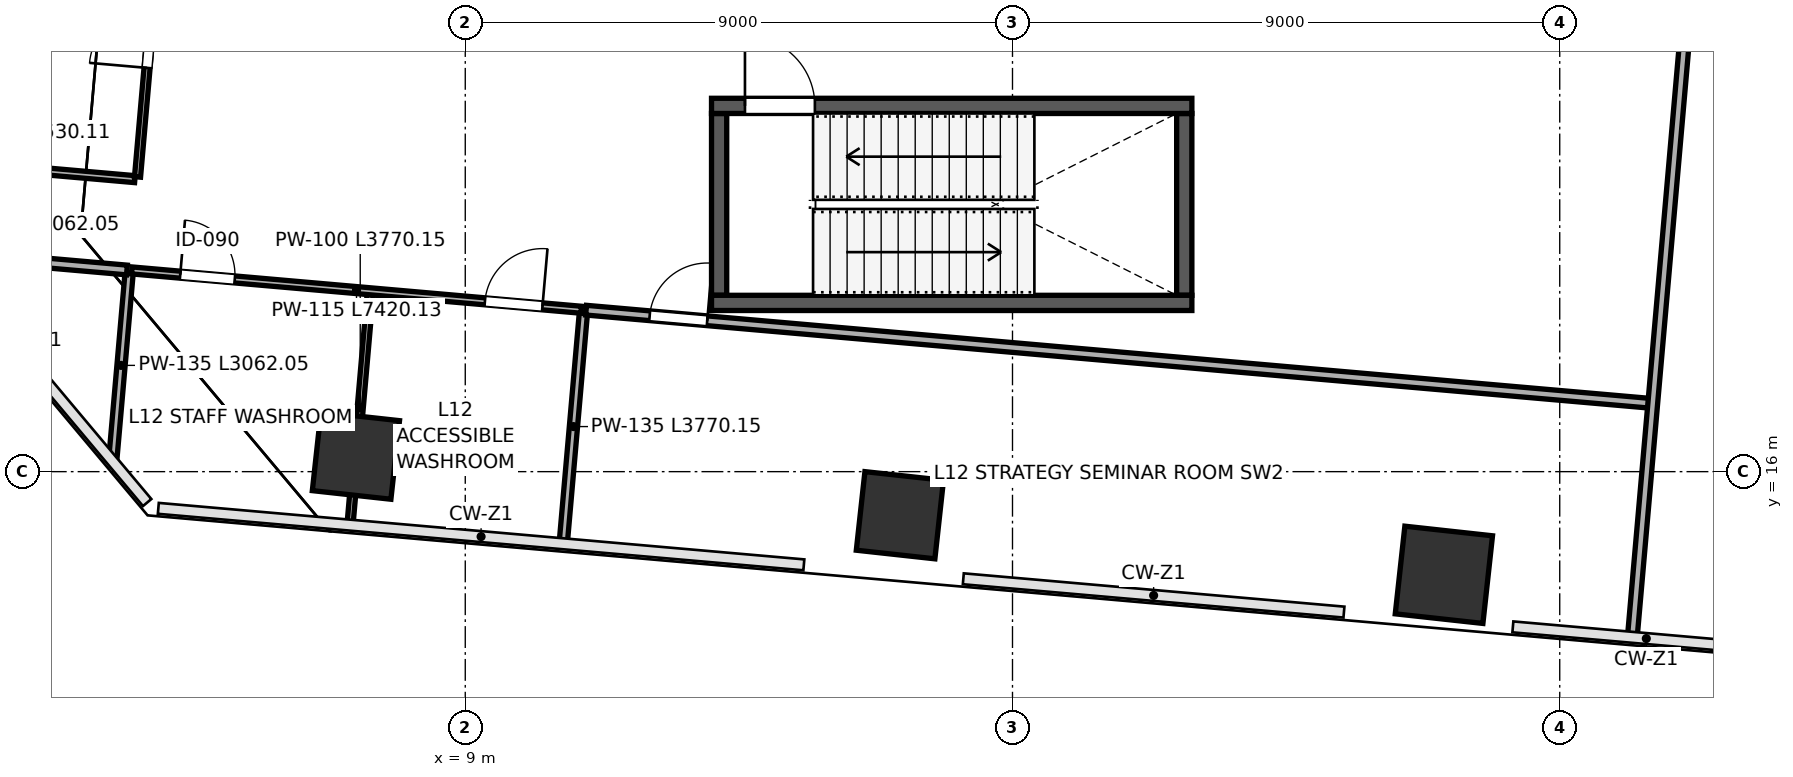
"""IFC4 building model, lengths in metres.
Left out: names, types, materials, properties, quantities, classifications, styles, units other than length and angle.
Written with IfcOpenShell. Run it as: python <this file> out.ifc"""

import sys

from ifc_helpers import new_model, si_unit, direction, frame, frame_2d, origin, origin_2d, place, context, subcontext, project, spatial, rectangle, extrude, clip, halfspace, source, transform, mapped, element, fill, save


model = new_model("IFC4")
c1 = context("Model", 3, precision=1e-05, world=origin(), true_north=direction((0.0, 1.0)))
c2 = subcontext(c1, "Body", "Model", "MODEL_VIEW")
j1 = project(units=[si_unit("LENGTHUNIT", "METRE"), si_unit("PLANEANGLEUNIT", "RADIAN")], contexts=[c1])
p1 = place(None, origin())
s1 = spatial("IfcSite", under=j1, at=p1, CompositionType="ELEMENT")
p2 = place(p1, origin())
s2 = spatial("IfcBuilding", under=s1, at=p2, CompositionType="ELEMENT")
p3 = place(p2, frame((0.0, 0.0, 56.8)))
s3 = spatial("IfcBuildingStorey", under=s2, at=p3, CompositionType="ELEMENT", Elevation=56.8)
p4 = place(p3, frame((7.202, 16.263, 0.0), z_axis=(-0.070522413376, 0.065409158709, 0.995363366399), x_axis=(0.75543486805, 0.655140067621, 0.010471481808)))
e1 = element("IfcColumn", 1, at=p4, inside=s3, PredefinedType="COLUMN", context=c2, shape_type="Clipping", body=[
    clip(clip(extrude(rectangle(XDim=1.3, YDim=1.3, at=origin_2d()), origin(), (0.0, 0.0, 1.0), 4.823), halfspace(frame((0.0, 0.0, 0.07), z_axis=(0.0, 0.0, -1.0), x_axis=(1.0, 0.0, 0.0)), False)), halfspace(frame((0.0, 0.0, 4.752), z_axis=(0.0, 0.0, 1.0), x_axis=(1.0, 0.0, 0.0)), False)),
])
p5 = place(p3, frame((16.148, 15.283, 0.0), z_axis=(-0.075443228527, 0.025097041748, 0.996834217794), x_axis=(0.416751618135, 0.908979188918, 0.008655801295)))
e2 = element("IfcColumn", 2, at=p5, inside=s3, PredefinedType="COLUMN", context=c2, shape_type="Clipping", body=[
    clip(clip(extrude(rectangle(XDim=1.3, YDim=1.3, at=origin_2d()), origin(), (0.0, 0.0, 1.0), 4.815), halfspace(frame((0.0, 0.0, 0.058), z_axis=(0.0, 0.0, -1.0), x_axis=(1.0, 0.0, 0.0)), False)), halfspace(frame((0.0, 0.0, 4.757), z_axis=(0.0, 0.0, 1.0), x_axis=(1.0, 0.0, 0.0)), False)),
])
p6 = place(p3, frame((25.095, 14.303, 0.0), z_axis=(-0.080295848656, -0.015410314389, 0.996651944712), x_axis=(-0.080801482977, 0.996690468965, 0.008901091172)))
e3 = element("IfcColumn", 3, at=p6, inside=s3, PredefinedType="COLUMN", context=c2, shape_type="Clipping", body=[
    clip(clip(extrude(rectangle(XDim=1.45, YDim=1.45, at=origin_2d()), origin(), (0.0, 0.0, 1.0), 4.816), halfspace(frame((0.0, 0.0, 0.066), z_axis=(0.0, 0.0, -1.0), x_axis=(1.0, 0.0, 0.0)), False)), halfspace(frame((0.0, 0.0, 4.75), z_axis=(0.0, 0.0, 1.0), x_axis=(1.0, 0.0, 0.0)), False)),
])
for number, where, z_axis, x_axis in (
    (4, (13.175, 18.9, 0.0), (0.0, 0.0, 1.0), (0.0, 1.0, 0.0)),
    (5, (20.825, 18.9, 0.0), (0.0, 0.0, 1.0), (0.0, 1.0, 0.0)),
):
    element("IfcWall", number, at=place(p3, frame(where, z_axis=z_axis, x_axis=x_axis)), inside=s3, PredefinedType="SHEAR", context=c2, shape_type="SweptSolid", body=[
        extrude(rectangle(XDim=2.99, YDim=0.25, at=frame_2d((1.495, 0.0))), origin(), (0.0, 0.0, 1.0), 4.56),
    ])
p7 = place(p3, frame((13.05, 18.775, 0.0), z_axis=(0.0, 0.0, 1.0), x_axis=(1.0, 0.0, 0.0)))
e6 = element("IfcWall", 6, at=p7, inside=s3, PredefinedType="SHEAR", context=c2, shape_type="SweptSolid", body=[
    extrude(rectangle(XDim=7.9, YDim=0.25, at=frame_2d((3.95, 0.0))), origin(), (0.0, 0.0, 1.0), 4.56),
])
p8 = place(p3, frame((13.05, 22.015, 0.0), z_axis=(0.0, 0.0, 1.0), x_axis=(1.0, 0.0, 0.0)))
e7 = element("IfcWall", 7, at=p8, inside=s3, PredefinedType="SHEAR", context=c2, shape_type="SweptSolid", body=[
    extrude(rectangle(XDim=7.9, YDim=0.25, at=frame_2d((3.95, 0.0))), origin(), (0.0, 0.0, 1.0), 4.56),
])
p9 = place(p8, frame((0.55, 0.0, 0.0)))
e8 = element("IfcOpeningElement", 8, at=p9, cuts=e7, PredefinedType="OPENING", context=c2, shape_type="SweptSolid", body=[
    extrude(rectangle(XDim=1.15, YDim=2.2, at=frame_2d((0.575, 1.1))), frame((0.0, 0.135, 0.0), z_axis=(0.0, -1.0, 0.0), x_axis=(1.0, 0.0, 0.0)), (0.0, 0.0, 1.0), 0.27),
])
p10 = place(p3, frame((3.205, 16.222, 0.0), z_axis=(0.0, 0.0, 1.0), x_axis=(0.087149146451, 0.996195275171, 0.0)))
e9 = element("IfcWall", 9, at=p10, inside=s3, PredefinedType="PARTITIONING", context=c2, shape_type="SweptSolid", body=[
    extrude(rectangle(XDim=3.062, YDim=0.135, at=frame_2d((1.531, 0.0))), origin(), (0.0, 0.0, 1.0), 4.56),
])
p11 = place(p3, frame((0.385, 19.583, 0.0), z_axis=(0.0, 0.0, 1.0), x_axis=(0.996195275171, -0.087149146451, 0.0)))
e10 = element("IfcWall", 10, at=p11, inside=s3, PredefinedType="PARTITIONING", context=c2, shape_type="SweptSolid", body=[
    extrude(rectangle(XDim=3.062, YDim=0.16, at=frame_2d((1.531, 0.0))), origin(), (0.0, 0.0, 1.0), 4.56),
])
p12 = place(p3, frame((7.108, 15.17, 0.0), z_axis=(0.0, 0.0, 1.0), x_axis=(0.087160523959, 0.996194279778, 0.0)))
e11 = element("IfcWall", 11, at=p12, inside=s3, PredefinedType="PARTITIONING", context=c2, shape_type="SweptSolid", body=[
    extrude(rectangle(XDim=3.77, YDim=0.1, at=frame_2d((1.885, 0.0))), origin(), (0.0, 0.0, 1.0), 3.695),
])
p13 = place(p3, frame((10.615, 14.863, 0.0), z_axis=(0.0, 0.0, 1.0), x_axis=(0.087160523959, 0.996194279778, 0.0)))
e12 = element("IfcWall", 12, at=p13, inside=s3, PredefinedType="PARTITIONING", context=c2, shape_type="SweptSolid", body=[
    extrude(rectangle(XDim=3.77, YDim=0.135, at=frame_2d((1.885, 0.0))), origin(), (0.0, 0.0, 1.0), 3.695),
])
p14 = place(p3, frame((3.515, 19.309, 0.0), z_axis=(0.0, 0.0, 1.0), x_axis=(0.99619725236, -0.0871265424, 0.0)))
e13 = element("IfcWall", 13, at=p14, inside=s3, PredefinedType="PARTITIONING", context=c2, shape_type="SweptSolid", body=[
    extrude(rectangle(XDim=7.42, YDim=0.115, at=frame_2d((3.71, 0.0))), origin(), (0.0, 0.0, 1.0), 4.56),
])
p15 = place(p14, frame((0.8, 0.0, 0.0)))
e14 = element("IfcOpeningElement", 14, at=p15, cuts=e13, PredefinedType="OPENING", context=c2, shape_type="SweptSolid", body=[
    extrude(rectangle(XDim=0.9, YDim=2.15, at=frame_2d((0.45, 1.075))), frame((0.0, 0.067, 0.0), z_axis=(0.0, -1.0, 0.0), x_axis=(1.0, 0.0, 0.0)), (0.0, 0.0, 1.0), 0.135),
])
p16 = place(p14, frame((5.83, 0.0, 0.0)))
e15 = element("IfcOpeningElement", 15, at=p16, cuts=e13, PredefinedType="OPENING", context=c2, shape_type="SweptSolid", body=[
    extrude(rectangle(XDim=0.95, YDim=2.15, at=frame_2d((0.475, 1.075))), frame((0.0, 0.067, 0.0), z_axis=(0.0, -1.0, 0.0), x_axis=(1.0, 0.0, 0.0)), (0.0, 0.0, 1.0), 0.135),
])
p17 = place(p3, frame((10.987, 18.656, 0.0), z_axis=(0.0, 0.0, 1.0), x_axis=(0.99619508988, -0.087151264471, 0.0)))
e16 = element("IfcWall", 16, at=p17, inside=s3, PredefinedType="PARTITIONING", context=c2, shape_type="SweptSolid", body=[
    extrude(rectangle(XDim=17.57, YDim=0.16, at=frame_2d((8.785, 0.0))), origin(), (0.0, 0.0, 1.0), 4.56),
])
p18 = place(p17, frame((1.05, 0.0, 0.0)))
e17 = element("IfcOpeningElement", 17, at=p18, cuts=e16, PredefinedType="OPENING", context=c2, shape_type="SweptSolid", body=[
    extrude(rectangle(XDim=0.95, YDim=2.15, at=frame_2d((0.475, 1.075))), frame((0.0, 0.09, 0.0), z_axis=(0.0, -1.0, 0.0), x_axis=(1.0, 0.0, 0.0)), (0.0, 0.0, 1.0), 0.18),
])
p19 = place(p3, frame((-0.05, 21.127, 0.0), z_axis=(0.0, 0.0, 1.0), x_axis=(0.996194520424, -0.087157773474, 0.0)))
e18 = element("IfcWall", 18, at=p19, inside=s3, PredefinedType="PARTITIONING", context=c2, shape_type="SweptSolid", body=[
    extrude(rectangle(XDim=3.63, YDim=0.115, at=frame_2d((1.815, 0.0))), origin(), (0.0, 0.0, 1.0), 4.56),
])
p20 = place(p3, frame((3.61, 20.847, 0.0), z_axis=(0.0, 0.0, 1.0), x_axis=(0.087153664928, 0.996194879875, 0.0)))
e19 = element("IfcWall", 19, at=p20, inside=s3, PredefinedType="PARTITIONING", context=c2, shape_type="SweptSolid", body=[
    extrude(rectangle(XDim=23.48, YDim=0.1, at=frame_2d((11.74, 0.0))), origin(), (0.0, 0.0, 1.0), 3.695),
])
p21 = place(p20, frame((1.8, 0.0, 0.0)))
e20 = element("IfcOpeningElement", 20, at=p21, cuts=e19, PredefinedType="OPENING", context=c2, shape_type="SweptSolid", body=[
    extrude(rectangle(XDim=0.95, YDim=2.15, at=frame_2d((0.475, 1.075))), frame((0.0, 0.06, 0.0), z_axis=(0.0, -1.0, 0.0), x_axis=(1.0, 0.0, 0.0)), (0.0, 0.0, 1.0), 0.12),
])
p22 = place(p3, frame((28.198, 13.325, 0.0), z_axis=(0.0, 0.0, 1.0), x_axis=(0.087154794008, 0.996194781095, 0.0)))
e21 = element("IfcWall", 21, at=p22, inside=s3, PredefinedType="PARTITIONING", context=c2, shape_type="SweptSolid", body=[
    extrude(rectangle(XDim=20.18, YDim=0.16, at=frame_2d((10.09, 0.0))), origin(), (0.0, 0.0, 1.0), 4.56),
])
m1 = source(origin(), c2, "Body", "SweptSolid", [
    extrude(rectangle(XDim=1.15, YDim=2.2, at=frame_2d((0.575, 1.1))), frame((0.0, 0.025, 0.0), z_axis=(0.0, -1.0, 0.0), x_axis=(1.0, 0.0, 0.0)), (0.0, 0.0, 1.0), 0.05),
])
p23 = place(p9, origin())
e22 = element("IfcDoor", 22, at=p23, inside=s3, OperationType="SINGLE_SWING_LEFT", PredefinedType="DOOR", context=c2, shape_type="MappedRepresentation", body=[
    mapped(m1, transform((0.0, 0.0, 0.0), scale=1.0)),
])
fill(e8, e22)
m2 = source(origin(), c2, "Body", "SweptSolid", [
    extrude(rectangle(XDim=0.9, YDim=2.15, at=frame_2d((0.45, 1.075))), frame((0.0, 0.025, 0.0), z_axis=(0.0, -1.0, 0.0), x_axis=(1.0, 0.0, 0.0)), (0.0, 0.0, 1.0), 0.05),
])
p24 = place(p15, origin())
e23 = element("IfcDoor", 23, at=p24, inside=s3, OperationType="SINGLE_SWING_LEFT", PredefinedType="DOOR", context=c2, shape_type="MappedRepresentation", body=[
    mapped(m2, transform((0.0, 0.0, 0.0), scale=1.0)),
])
fill(e14, e23)
m3 = source(origin(), c2, "Body", "SweptSolid", [
    extrude(rectangle(XDim=0.95, YDim=2.15, at=frame_2d((0.475, 1.075))), frame((0.0, 0.025, 0.0), z_axis=(0.0, -1.0, 0.0), x_axis=(1.0, 0.0, 0.0)), (0.0, 0.0, 1.0), 0.05),
])
p25 = place(p16, origin())
e24 = element("IfcDoor", 24, at=p25, inside=s3, OperationType="SINGLE_SWING_RIGHT", PredefinedType="DOOR", context=c2, shape_type="MappedRepresentation", body=[
    mapped(m3, transform((0.0, 0.0, 0.0), scale=1.0)),
])
fill(e15, e24)
m4 = source(origin(), c2, "Body", "SweptSolid", [
    extrude(rectangle(XDim=0.95, YDim=2.15, at=frame_2d((0.475, 1.075))), frame((0.0, 0.025, 0.0), z_axis=(0.0, -1.0, 0.0), x_axis=(1.0, 0.0, 0.0)), (0.0, 0.0, 1.0), 0.05),
])
p26 = place(p18, origin())
e25 = element("IfcDoor", 25, at=p26, inside=s3, OperationType="SINGLE_SWING_RIGHT", PredefinedType="DOOR", context=c2, shape_type="MappedRepresentation", body=[
    mapped(m4, transform((0.0, 0.0, 0.0), scale=1.0)),
])
fill(e17, e25)
p27 = place(p21, origin())
e26 = element("IfcDoor", 26, at=p27, inside=s3, OperationType="SINGLE_SWING_LEFT", PredefinedType="DOOR", context=c2, shape_type="MappedRepresentation", body=[
    mapped(m3, transform((0.0, 0.0, 0.0), scale=1.0)),
])
fill(e20, e26)
save(model, sys.argv[1])
